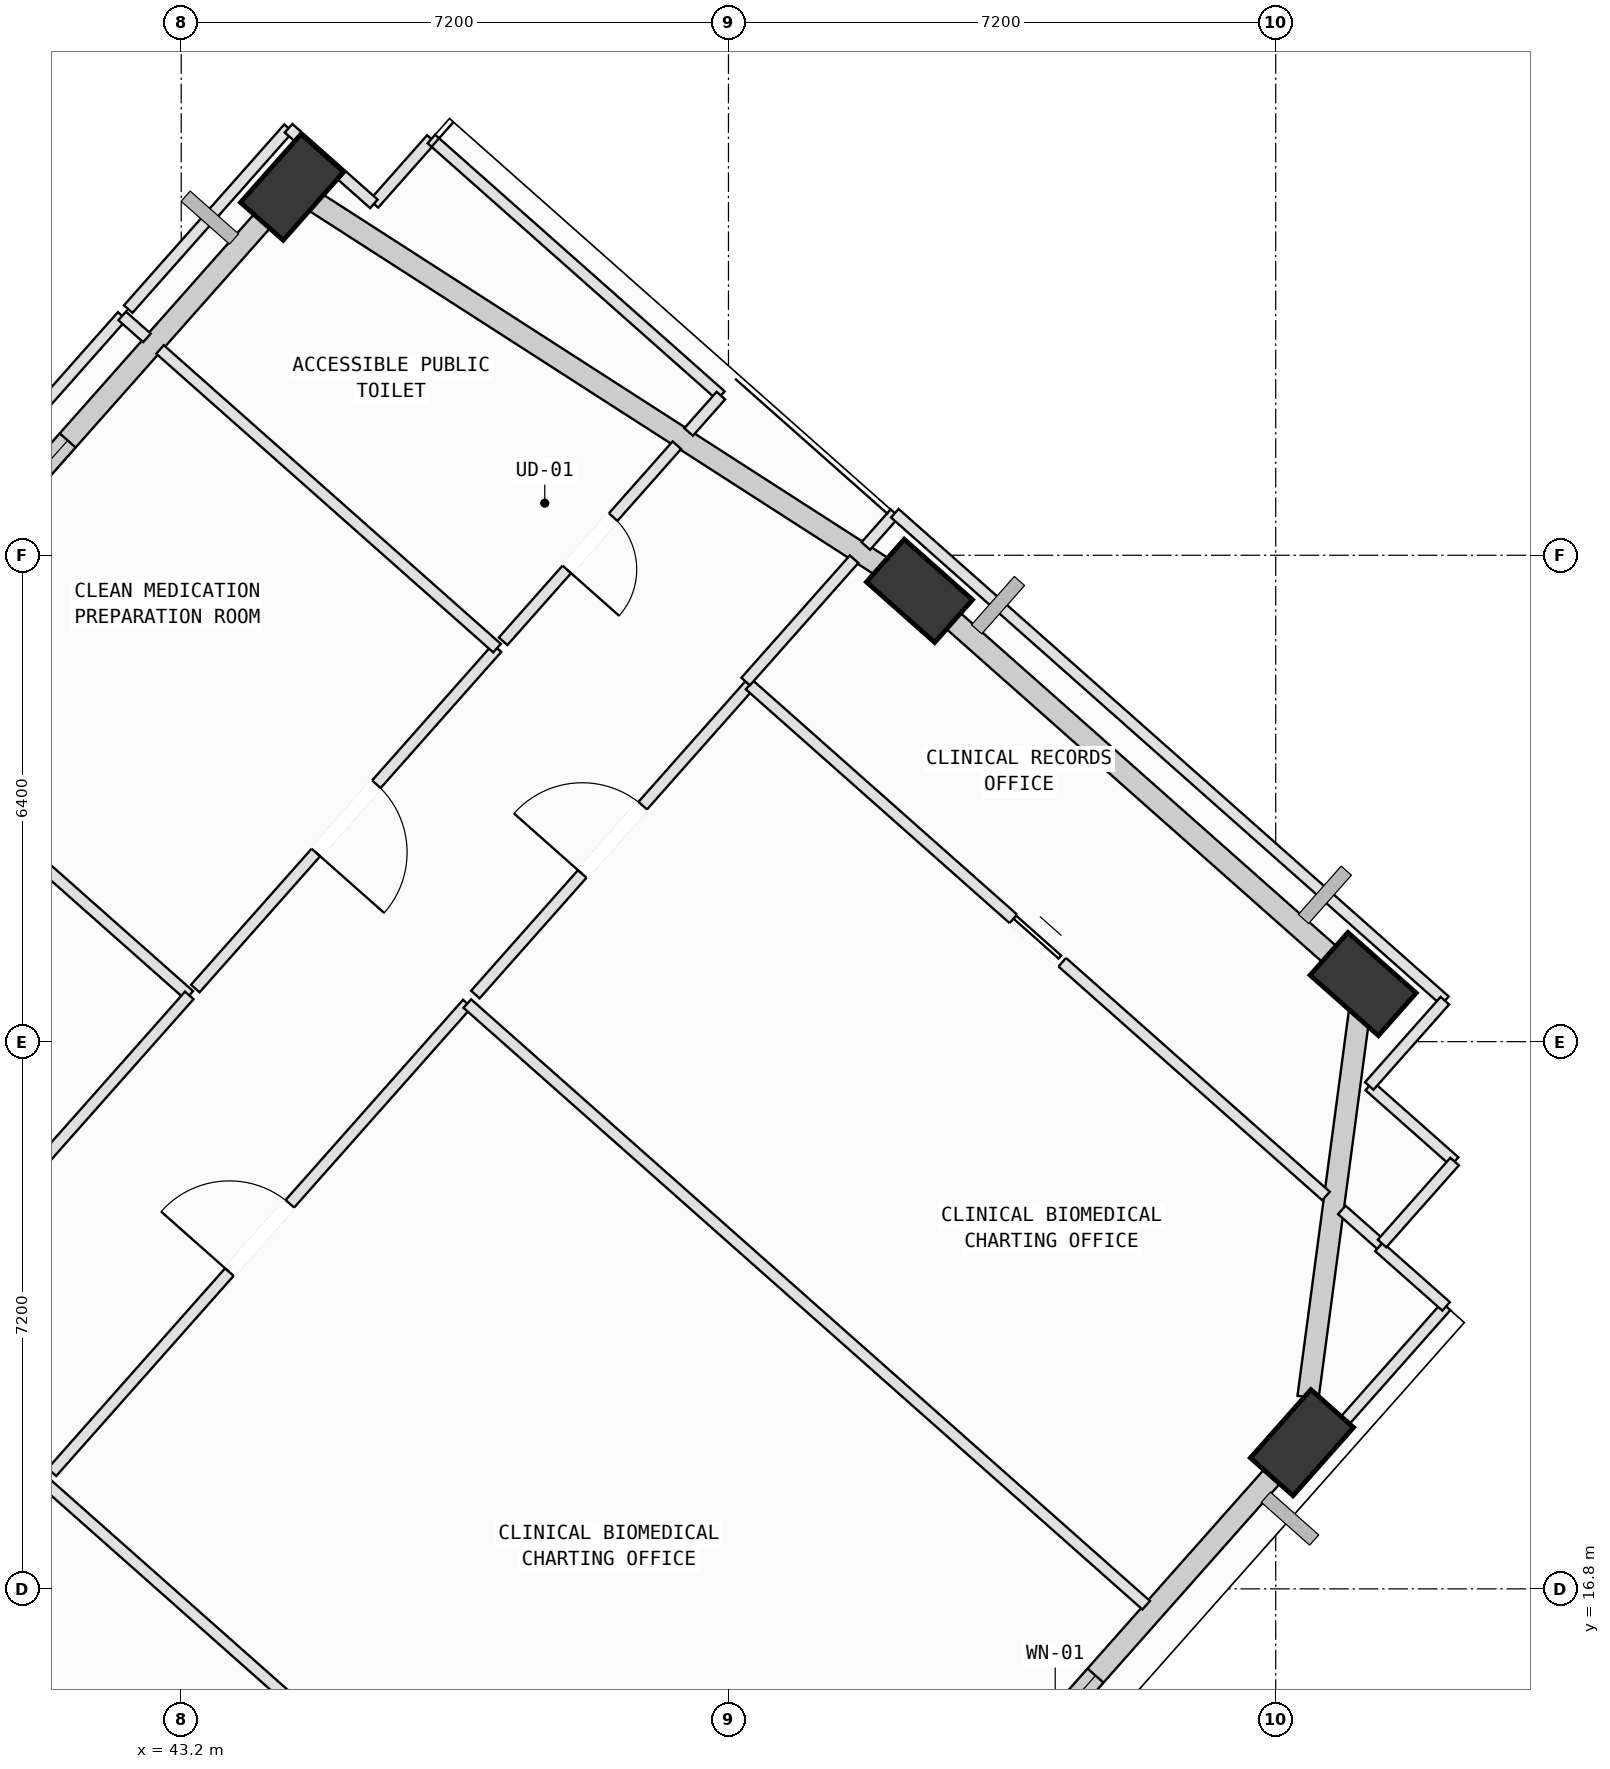
"""IFC4 building model, lengths in metres.
Left out: names, types, materials, properties, quantities, classifications, styles, units other than length and angle.
Written with IfcOpenShell. Run it as: python <this file> out.ifc"""

import sys

from ifc_helpers import new_model, si_unit, direction, frame, frame_2d, origin, origin_2d, place, context, subcontext, project, spatial, rectangle, extrude, element, fill, save


model = new_model("IFC4")
c1 = context("Model", 3, precision=1e-05, world=origin(), true_north=direction((0.0, 1.0)))
c2 = subcontext(c1, "Body", "Model", "MODEL_VIEW")
j1 = project(units=[si_unit("LENGTHUNIT", "METRE"), si_unit("PLANEANGLEUNIT", "RADIAN")], contexts=[c1])
p1 = place(None, origin())
s1 = spatial("IfcSite", under=j1, at=p1, CompositionType="ELEMENT")
p2 = place(p1, origin())
s2 = spatial("IfcBuilding", under=s1, at=p2, CompositionType="ELEMENT")
p3 = place(p2, frame((0.0, 0.0, 231.2)))
s3 = spatial("IfcBuildingStorey", under=s2, at=p3, CompositionType="ELEMENT", Elevation=231.2)
p4 = place(p3, frame((57.945, 18.724, 0.002), z_axis=(0.024244575216, 0.100563338303, 0.994635217334), x_axis=(-0.819257234267, -0.568176392218, 0.077415576125)))
e1 = element("IfcColumn", 1, at=p4, inside=s3, PredefinedType="COLUMN", context=c2, shape_type="SweptSolid", body=[
    extrude(rectangle(XDim=1.2, YDim=0.75, at=origin_2d()), origin(), (0.0, 0.0, 1.0), 4.018),
])
p5 = place(p3, frame((58.75, 24.758, 0.002), z_axis=(-0.000729143528, 0.103659904865, 0.994612533841), x_axis=(0.75299889112, -0.654419747478, 0.068756556655)))
e2 = element("IfcColumn", 2, at=p5, inside=s3, PredefinedType="COLUMN", context=c2, shape_type="SweptSolid", body=[
    extrude(rectangle(XDim=1.2, YDim=0.75, at=origin_2d()), origin(), (0.0, 0.0, 1.0), 4.018),
])
p6 = place(p3, frame((52.913, 29.931, 0.002), z_axis=(-0.021856792511, 0.079634218953, 0.996584503087), x_axis=(0.896641355802, -0.439356621925, 0.054772601149)))
e3 = element("IfcColumn", 3, at=p6, inside=s3, PredefinedType="COLUMN", context=c2, shape_type="SweptSolid", body=[
    extrude(rectangle(XDim=1.2, YDim=0.75, at=origin_2d()), origin(), (0.0, 0.0, 1.0), 4.01),
])
p7 = place(p3, frame((44.659, 35.243, 0.002), z_axis=(-0.043593596466, 0.045361728351, 0.998018993781), x_axis=(0.039301634257, -0.998117518845, 0.047082906868)))
e4 = element("IfcColumn", 4, at=p7, inside=s3, PredefinedType="COLUMN", context=c2, shape_type="SweptSolid", body=[
    extrude(rectangle(XDim=1.2, YDim=0.75, at=origin_2d()), origin(), (0.0, 0.0, 1.0), 4.004),
])
p8 = place(p3, frame((57.812, 18.573, 0.0), z_axis=(0.0, 0.0, 1.0), x_axis=(-0.663260552, -0.748388562287, 0.0)))
e5 = element("IfcWall", 5, at=p8, inside=s3, PredefinedType="SOLIDWALL", context=c2, shape_type="SweptSolid", body=[
    extrude(rectangle(XDim=6.418, YDim=0.28, at=frame_2d((3.209, 0.0))), origin(), (0.0, 0.0, 1.0), 3.265),
])
p9 = place(p8, frame((3.893, 0.0, 0.75)))
e6 = element("IfcOpeningElement", 6, at=p9, cuts=e5, PredefinedType="OPENING", context=c2, shape_type="SweptSolid", body=[
    extrude(rectangle(XDim=1.6, YDim=1.95, at=frame_2d((0.8, 0.975))), frame((0.0, 0.15, 0.0), z_axis=(0.0, -1.0, 0.0), x_axis=(1.0, 0.0, 0.0)), (0.0, 0.0, 1.0), 0.3),
])
p10 = place(p3, frame((58.725, 24.569, 0.0), z_axis=(0.0, 0.0, 1.0), x_axis=(-0.132266427594, -0.991214200933, 0.0)))
e7 = element("IfcWall", 7, at=p10, inside=s3, PredefinedType="SOLIDWALL", context=c2, shape_type="SweptSolid", body=[
    extrude(rectangle(XDim=5.294, YDim=0.28, at=frame_2d((2.647, 0.0))), origin(), (0.0, 0.0, 1.0), 3.265),
])
p11 = place(p3, frame((53.099, 29.767, 0.0), z_axis=(0.0, 0.0, 1.0), x_axis=(0.748389152316, -0.66325988624, 0.0)))
e8 = element("IfcWall", 8, at=p11, inside=s3, PredefinedType="SOLIDWALL", context=c2, shape_type="SweptSolid", body=[
    extrude(rectangle(XDim=7.046, YDim=0.28, at=frame_2d((3.523, 0.0))), origin(), (0.0, 0.0, 1.0), 3.265),
])
p12 = place(p3, frame((44.889, 35.094, 0.0), z_axis=(0.0, 0.0, 1.0), x_axis=(0.840951921369, -0.541109846469, 0.0)))
e9 = element("IfcWall", 9, at=p12, inside=s3, PredefinedType="SOLIDWALL", context=c2, shape_type="SweptSolid", body=[
    extrude(rectangle(XDim=9.036, YDim=0.28, at=frame_2d((4.518, 0.0))), origin(), (0.0, 0.0, 1.0), 3.265),
])
p13 = place(p3, frame((39.919, 29.894, 0.0), z_axis=(0.0, 0.0, 1.0), x_axis=(0.663279097032, 0.748372126311, 0.0)))
e10 = element("IfcWall", 10, at=p13, inside=s3, PredefinedType="SOLIDWALL", context=c2, shape_type="SweptSolid", body=[
    extrude(rectangle(XDim=6.78, YDim=0.28, at=frame_2d((3.39, 0.0))), origin(), (0.0, 0.0, 1.0), 3.265),
])
p14 = place(p13, frame((1.495, 0.0, 0.75)))
e11 = element("IfcOpeningElement", 11, at=p14, cuts=e10, PredefinedType="OPENING", context=c2, shape_type="SweptSolid", body=[
    extrude(rectangle(XDim=1.2, YDim=1.75, at=frame_2d((0.6, 0.875))), frame((0.0, 0.15, 0.0), z_axis=(0.0, -1.0, 0.0), x_axis=(1.0, 0.0, 0.0)), (0.0, 0.0, 1.0), 0.3),
])
p15 = place(p3, frame((41.43, 18.181, 0.0), z_axis=(0.0, 0.0, 1.0), x_axis=(0.748405797498, -0.663241104178, 0.0)))
e12 = element("IfcWall", 12, at=p15, inside=s3, PredefinedType="PARTITIONING", context=c2, shape_type="SweptSolid", body=[
    extrude(rectangle(XDim=11.885, YDim=0.15, at=frame_2d((5.943, 0.0))), origin(), (0.0, 0.0, 1.0), 3.78),
])
p16 = place(p3, frame((41.499, 18.334, 0.0), z_axis=(0.0, 0.0, 1.0), x_axis=(0.663232090045, 0.748413785773, 0.0)))
e13 = element("IfcWall", 13, at=p16, inside=s3, PredefinedType="PARTITIONING", context=c2, shape_type="SweptSolid", body=[
    extrude(rectangle(XDim=8.24, YDim=0.15, at=frame_2d((4.12, 0.0))), origin(), (0.0, 0.0, 1.0), 3.78),
])
p17 = place(p16, frame((3.52, 0.0, 0.0)))
e14 = element("IfcOpeningElement", 14, at=p17, cuts=e13, PredefinedType="OPENING", context=c2, shape_type="SweptSolid", body=[
    extrude(rectangle(XDim=1.2, YDim=2.15, at=frame_2d((0.6, 1.075))), frame((0.0, 0.085, 0.0), z_axis=(0.0, -1.0, 0.0), x_axis=(1.0, 0.0, 0.0)), (0.0, 0.0, 1.0), 0.17),
])
p18 = place(p3, frame((46.964, 24.501, 0.0), z_axis=(0.0, 0.0, 1.0), x_axis=(0.748383631113, -0.663266116037, 0.0)))
e15 = element("IfcWall", 15, at=p18, inside=s3, PredefinedType="PARTITIONING", context=c2, shape_type="SweptSolid", body=[
    extrude(rectangle(XDim=11.935, YDim=0.15, at=frame_2d((5.967, 0.0))), origin(), (0.0, 0.0, 1.0), 3.78),
])
p19 = place(p3, frame((59.842, 20.517, 0.0), z_axis=(0.0, 0.0, 1.0), x_axis=(-0.663167767646, -0.748470782299, 0.0)))
e16 = element("IfcWall", 16, at=p19, inside=s3, PredefinedType="PARTITIONING", context=c2, shape_type="SweptSolid", body=[
    extrude(rectangle(XDim=2.802, YDim=0.15, at=frame_2d((1.401, 0.0))), origin(), (0.0, 0.0, 1.0), 3.265),
])
p20 = place(p3, frame((47.07, 24.62, 0.0), z_axis=(0.0, 0.0, 1.0), x_axis=(0.663187557716, 0.748453247231, 0.0)))
e17 = element("IfcWall", 17, at=p20, inside=s3, PredefinedType="PARTITIONING", context=c2, shape_type="SweptSolid", body=[
    extrude(rectangle(XDim=5.44, YDim=0.15, at=frame_2d((2.72, 0.0))), origin(), (0.0, 0.0, 1.0), 3.78),
])
p21 = place(p20, frame((2.12, 0.0, 0.0)))
e18 = element("IfcOpeningElement", 18, at=p21, cuts=e17, PredefinedType="OPENING", context=c2, shape_type="SweptSolid", body=[
    extrude(rectangle(XDim=1.2, YDim=2.15, at=frame_2d((0.6, 1.075))), frame((0.0, 0.085, 0.0), z_axis=(0.0, -1.0, 0.0), x_axis=(1.0, 0.0, 0.0)), (0.0, 0.0, 1.0), 0.17),
])
p22 = place(p3, frame((50.678, 28.692, 0.0), z_axis=(0.0, 0.0, 1.0), x_axis=(0.748311065443, -0.663347985099, 0.0)))
e19 = element("IfcWall", 19, at=p22, inside=s3, PredefinedType="PARTITIONING", context=c2, shape_type="SweptSolid", body=[
    extrude(rectangle(XDim=10.135, YDim=0.15, at=frame_2d((5.067, 0.0))), origin(), (0.0, 0.0, 1.0), 3.78),
])
p23 = place(p22, frame((4.637, 0.0, 0.0)))
e20 = element("IfcOpeningElement", 20, at=p23, cuts=e19, PredefinedType="OPENING", context=c2, shape_type="SweptSolid", body=[
    extrude(rectangle(XDim=0.86, YDim=2.06, at=frame_2d((0.43, 1.03))), frame((0.0, 0.085, 0.0), z_axis=(0.0, -1.0, 0.0), x_axis=(1.0, 0.0, 0.0)), (0.0, 0.0, 1.0), 0.17),
])
p24 = place(p3, frame((58.47, 21.786, 0.0), z_axis=(0.0, 0.0, 1.0), x_axis=(0.748210908834, -0.663460952809, 0.0)))
e21 = element("IfcWall", 21, at=p24, inside=s3, PredefinedType="PARTITIONING", context=c2, shape_type="SweptSolid", body=[
    extrude(rectangle(XDim=0.688, YDim=0.15, at=frame_2d((0.344, 0.0))), origin(), (0.0, 0.0, 1.0), 3.78),
])
p25 = place(p3, frame((58.959, 21.299, 0.0), z_axis=(0.0, 0.0, 1.0), x_axis=(0.748652751878, -0.662962334605, 0.0)))
e22 = element("IfcWall", 22, at=p25, inside=s3, PredefinedType="PARTITIONING", context=c2, shape_type="SweptSolid", body=[
    extrude(rectangle(XDim=1.179, YDim=0.15, at=frame_2d((0.59, 0.0))), origin(), (0.0, 0.0, 1.0), 3.78),
])
p26 = place(p3, frame((38.871, 28.539, 0.0), z_axis=(0.0, 0.0, 1.0), x_axis=(0.748404106831, -0.663243011933, 0.0)))
e23 = element("IfcWall", 23, at=p26, inside=s3, PredefinedType="PARTITIONING", context=c2, shape_type="SweptSolid", body=[
    extrude(rectangle(XDim=5.926, YDim=0.15, at=frame_2d((2.963, 0.0))), origin(), (0.0, 0.0, 1.0), 3.78),
])
p27 = place(p3, frame((43.306, 24.609, 0.0), z_axis=(0.0, 0.0, 1.0), x_axis=(-0.663353083876, -0.74830654555, 0.0)))
e24 = element("IfcWall", 24, at=p27, inside=s3, PredefinedType="PARTITIONING", context=c2, shape_type="SweptSolid", body=[
    extrude(rectangle(XDim=5.25, YDim=0.15, at=frame_2d((2.625, 0.0))), origin(), (0.0, 0.0, 1.0), 3.78),
])
p28 = place(p3, frame((47.355, 29.178, 0.0), z_axis=(0.0, 0.0, 1.0), x_axis=(-0.663302322505, -0.748351541029, 0.0)))
e25 = element("IfcWall", 25, at=p28, inside=s3, PredefinedType="PARTITIONING", context=c2, shape_type="SweptSolid", body=[
    extrude(rectangle(XDim=5.985, YDim=0.15, at=frame_2d((2.993, 0.0))), origin(), (0.0, 0.0, 1.0), 3.78),
])
p29 = place(p28, frame((2.393, 0.0, 0.0)))
e26 = element("IfcOpeningElement", 26, at=p29, cuts=e25, PredefinedType="OPENING", context=c2, shape_type="SweptSolid", body=[
    extrude(rectangle(XDim=1.2, YDim=2.15, at=frame_2d((0.6, 1.075))), frame((0.0, 0.085, 0.0), z_axis=(0.0, -1.0, 0.0), x_axis=(1.0, 0.0, 0.0)), (0.0, 0.0, 1.0), 0.17),
])
p30 = place(p3, frame((38.454, 29.07, 0.0), z_axis=(0.0, 0.0, 1.0), x_axis=(0.663210930947, 0.748432536086, 0.0)))
e27 = element("IfcWall", 27, at=p30, inside=s3, PredefinedType="PARTITIONING", context=c2, shape_type="SweptSolid", body=[
    extrude(rectangle(XDim=5.985, YDim=0.15, at=frame_2d((2.992, 0.0))), origin(), (0.0, 0.0, 1.0), 3.265),
])
p31 = place(p3, frame((42.423, 33.549, 0.0), z_axis=(0.0, 0.0, 1.0), x_axis=(0.74815091613, -0.66352860277, 0.0)))
e28 = element("IfcWall", 28, at=p31, inside=s3, PredefinedType="PARTITIONING", context=c2, shape_type="SweptSolid", body=[
    extrude(rectangle(XDim=0.436, YDim=0.15, at=frame_2d((0.218, 0.0))), origin(), (0.0, 0.0, 1.0), 3.78),
])
p32 = place(p3, frame((42.921, 33.108, 0.0), z_axis=(0.0, 0.0, 1.0), x_axis=(0.748370181547, -0.663281291287, 0.0)))
e29 = element("IfcWall", 29, at=p32, inside=s3, PredefinedType="PARTITIONING", context=c2, shape_type="SweptSolid", body=[
    extrude(rectangle(XDim=5.925, YDim=0.15, at=frame_2d((2.962, 0.0))), origin(), (0.0, 0.0, 1.0), 3.78),
])
p33 = place(p3, frame((45.735, 35.024, 0.0), z_axis=(0.0, 0.0, 1.0), x_axis=(0.663192997038, 0.748448427535, 0.0)))
e30 = element("IfcWall", 30, at=p33, inside=s3, PredefinedType="PARTITIONING", context=c2, shape_type="SweptSolid", body=[
    extrude(rectangle(XDim=1.14, YDim=0.15, at=frame_2d((0.57, 0.0))), origin(), (0.0, 0.0, 1.0), 3.78),
])
p34 = place(p3, frame((46.491, 35.877, 0.0), z_axis=(0.0, 0.0, 1.0), x_axis=(0.748371830726, -0.663279430539, 0.0)))
e31 = element("IfcWall", 31, at=p34, inside=s3, PredefinedType="PARTITIONING", context=c2, shape_type="SweptSolid", body=[
    extrude(rectangle(XDim=5.09, YDim=0.15, at=frame_2d((2.545, 0.0))), origin(), (0.0, 0.0, 1.0), 3.78),
])
p35 = place(p3, frame((50.3, 32.501, 0.0), z_axis=(0.0, 0.0, 1.0), x_axis=(-0.662870257148, -0.748734280095, 0.0)))
e32 = element("IfcWall", 32, at=p35, inside=s3, PredefinedType="PARTITIONING", context=c2, shape_type="SweptSolid", body=[
    extrude(rectangle(XDim=0.64, YDim=0.15, at=frame_2d((0.32, 0.0))), origin(), (0.0, 0.0, 1.0), 3.78),
])
p36 = place(p3, frame((49.721, 31.848, 0.0), z_axis=(0.0, 0.0, 1.0), x_axis=(-0.663180392012, -0.748459596539, 0.0)))
e33 = element("IfcWall", 33, at=p36, inside=s3, PredefinedType="PARTITIONING", context=c2, shape_type="SweptSolid", body=[
    extrude(rectangle(XDim=3.447, YDim=0.15, at=frame_2d((1.723, 0.0))), origin(), (0.0, 0.0, 1.0), 3.78),
])
p37 = place(p36, frame((1.263, 0.0, 0.0)))
e34 = element("IfcOpeningElement", 34, at=p37, cuts=e33, PredefinedType="OPENING", context=c2, shape_type="SweptSolid", body=[
    extrude(rectangle(XDim=0.92, YDim=2.1, at=frame_2d((0.46, 1.05))), frame((0.0, 0.085, 0.0), z_axis=(0.0, -1.0, 0.0), x_axis=(1.0, 0.0, 0.0)), (0.0, 0.0, 1.0), 0.17),
])
p38 = place(p3, frame((42.503, 33.639, 0.0), z_axis=(0.0, 0.0, 1.0), x_axis=(0.663214683657, 0.748429210669, 0.0)))
e35 = element("IfcWall", 35, at=p38, inside=s3, PredefinedType="PARTITIONING", context=c2, shape_type="SweptSolid", body=[
    extrude(rectangle(XDim=3.18, YDim=0.15, at=frame_2d((1.59, 0.0))), origin(), (0.0, 0.0, 1.0), 3.265),
])
p39 = place(p3, frame((44.612, 36.019, 0.0), z_axis=(0.0, 0.0, 1.0), x_axis=(0.748449721944, -0.663191536227, 0.0)))
e36 = element("IfcWall", 36, at=p39, inside=s3, PredefinedType="PARTITIONING", context=c2, shape_type="SweptSolid", body=[
    extrude(rectangle(XDim=1.5, YDim=0.15, at=frame_2d((0.75, 0.0))), origin(), (0.0, 0.0, 1.0), 3.265),
])
p40 = place(p3, frame((58.831, 23.417, 0.0), z_axis=(0.0, 0.0, 1.0), x_axis=(0.748530486985, -0.663100377057, 0.0)))
e37 = element("IfcWall", 37, at=p40, inside=s3, PredefinedType="PARTITIONING", context=c2, shape_type="SweptSolid", body=[
    extrude(rectangle(XDim=1.5, YDim=0.15, at=frame_2d((0.75, 0.0))), origin(), (0.0, 0.0, 1.0), 3.78),
])
p41 = place(p3, frame((59.954, 22.422, 0.0), z_axis=(0.0, 0.0, 1.0), x_axis=(-0.663100377057, -0.748530486985, 0.0)))
e38 = element("IfcWall", 38, at=p41, inside=s3, PredefinedType="PARTITIONING", context=c2, shape_type="SweptSolid", body=[
    extrude(rectangle(XDim=1.44, YDim=0.15, at=frame_2d((0.72, 0.0))), origin(), (0.0, 0.0, 1.0), 3.78),
])
p42 = place(p3, frame((50.626, 28.738, 0.0), z_axis=(0.0, 0.0, 1.0), x_axis=(0.663327736114, 0.748329014874, 0.0)))
e39 = element("IfcWall", 39, at=p42, inside=s3, PredefinedType="PARTITIONING", context=c2, shape_type="SweptSolid", body=[
    extrude(rectangle(XDim=2.151, YDim=0.15, at=frame_2d((1.076, 0.0))), origin(), (0.0, 0.0, 1.0), 3.78),
])
p43 = place(p3, frame((52.207, 30.522, 0.0), z_axis=(0.0, 0.0, 1.0), x_axis=(0.663442394295, 0.748227364811, 0.0)))
e40 = element("IfcWall", 40, at=p43, inside=s3, PredefinedType="PARTITIONING", context=c2, shape_type="SweptSolid", body=[
    extrude(rectangle(XDim=0.576, YDim=0.15, at=frame_2d((0.288, 0.0))), origin(), (0.0, 0.0, 1.0), 3.78),
])
p44 = place(p3, frame((52.589, 30.953, 0.0), z_axis=(0.0, 0.0, 1.0), x_axis=(0.74837940849, -0.663270880522, 0.0)))
e41 = element("IfcWall", 41, at=p44, inside=s3, PredefinedType="PARTITIONING", context=c2, shape_type="SweptSolid", body=[
    extrude(rectangle(XDim=9.67, YDim=0.15, at=frame_2d((4.835, 0.0))), origin(), (0.0, 0.0, 1.0), 3.265),
])
p45 = place(p3, frame((59.826, 24.539, 0.0), z_axis=(0.0, 0.0, 1.0), x_axis=(-0.663423545506, -0.748244077336, 0.0)))
e42 = element("IfcWall", 42, at=p45, inside=s3, PredefinedType="PARTITIONING", context=c2, shape_type="SweptSolid", body=[
    extrude(rectangle(XDim=1.5, YDim=0.15, at=frame_2d((0.75, 0.0))), origin(), (0.0, 0.0, 1.0), 3.78),
])
p46 = place(p9, origin())
e43 = element("IfcWindow", 43, at=p46, inside=s3, PartitioningType="SINGLE_PANEL", PredefinedType="WINDOW", context=c2, shape_type="SweptSolid", body=[
    extrude(rectangle(XDim=1.6, YDim=1.95, at=frame_2d((0.8, 0.975))), frame((0.0, 0.03, 0.0), z_axis=(0.0, -1.0, 0.0), x_axis=(1.0, 0.0, 0.0)), (0.0, 0.0, 1.0), 0.06),
])
fill(e6, e43)
p47 = place(p14, origin())
e44 = element("IfcWindow", 44, at=p47, inside=s3, PartitioningType="SINGLE_PANEL", PredefinedType="WINDOW", context=c2, shape_type="SweptSolid", body=[
    extrude(rectangle(XDim=1.2, YDim=1.75, at=frame_2d((0.6, 0.875))), frame((0.0, 0.03, 0.0), z_axis=(0.0, -1.0, 0.0), x_axis=(1.0, 0.0, 0.0)), (0.0, 0.0, 1.0), 0.06),
])
fill(e11, e44)
p48 = place(p17, origin())
e45 = element("IfcDoor", 45, at=p48, inside=s3, OperationType="SINGLE_SWING_LEFT", PredefinedType="DOOR", context=c2, shape_type="SweptSolid", body=[
    extrude(rectangle(XDim=1.2, YDim=2.15, at=frame_2d((0.6, 1.075))), frame((0.0, 0.025, 0.0), z_axis=(0.0, -1.0, 0.0), x_axis=(1.0, 0.0, 0.0)), (0.0, 0.0, 1.0), 0.05),
])
fill(e14, e45)
p49 = place(p21, origin())
e46 = element("IfcDoor", 46, at=p49, inside=s3, OperationType="SINGLE_SWING_LEFT", PredefinedType="DOOR", context=c2, shape_type="SweptSolid", body=[
    extrude(rectangle(XDim=1.2, YDim=2.15, at=frame_2d((0.6, 1.075))), frame((0.0, 0.025, 0.0), z_axis=(0.0, -1.0, 0.0), x_axis=(1.0, 0.0, 0.0)), (0.0, 0.0, 1.0), 0.05),
])
fill(e18, e46)
p50 = place(p29, origin())
e47 = element("IfcDoor", 47, at=p50, inside=s3, OperationType="SINGLE_SWING_RIGHT", PredefinedType="DOOR", context=c2, shape_type="SweptSolid", body=[
    extrude(rectangle(XDim=1.2, YDim=2.15, at=frame_2d((0.6, 1.075))), frame((0.0, 0.025, 0.0), z_axis=(0.0, -1.0, 0.0), x_axis=(1.0, 0.0, 0.0)), (0.0, 0.0, 1.0), 0.05),
])
fill(e26, e47)
p51 = place(p37, origin())
e48 = element("IfcDoor", 48, at=p51, inside=s3, OperationType="SINGLE_SWING_RIGHT", PredefinedType="DOOR", context=c2, shape_type="SweptSolid", body=[
    extrude(rectangle(XDim=0.92, YDim=2.1, at=frame_2d((0.46, 1.05))), frame((0.0, 0.025, 0.0), z_axis=(0.0, -1.0, 0.0), x_axis=(1.0, 0.0, 0.0)), (0.0, 0.0, 1.0), 0.05),
])
fill(e34, e48)
p52 = place(p23, origin())
e49 = element("IfcDoor", 49, at=p52, inside=s3, OperationType="SLIDING_TO_LEFT", PredefinedType="DOOR", context=c2, shape_type="SweptSolid", body=[
    extrude(rectangle(XDim=0.86, YDim=2.06, at=frame_2d((0.43, 1.03))), frame((0.0, 0.025, 0.0), z_axis=(0.0, -1.0, 0.0), x_axis=(1.0, 0.0, 0.0)), (0.0, 0.0, 1.0), 0.05),
])
fill(e20, e49)
save(model, sys.argv[1])
